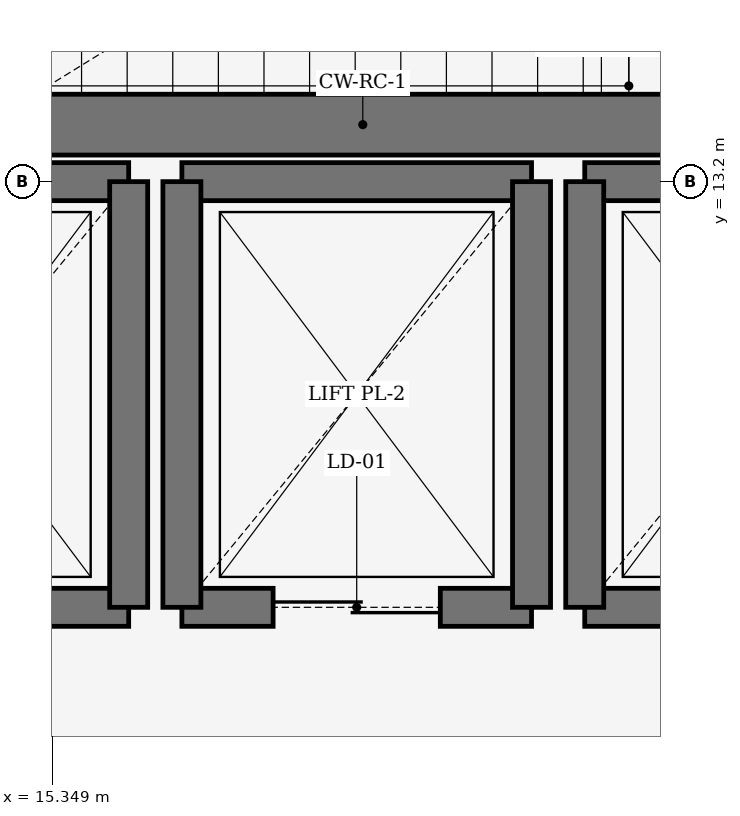
"""IFC4 building model, lengths in metres.
Left out: names, types, materials, properties, quantities, classifications, styles, units other than length and angle.
Written with IfcOpenShell. Run it as: python <this file> out.ifc"""

import sys

from ifc_helpers import new_model, si_unit, direction, frame, frame_2d, origin, place, context, subcontext, project, spatial, rectangle, extrude, element, fill, save


model = new_model("IFC4")
c1 = context("Model", 3, precision=1e-05, world=origin(), true_north=direction((0.0, 1.0)))
c2 = subcontext(c1, "Body", "Model", "MODEL_VIEW")
j1 = project(units=[si_unit("LENGTHUNIT", "METRE"), si_unit("PLANEANGLEUNIT", "RADIAN")], contexts=[c1])
p1 = place(None, origin())
s1 = spatial("IfcSite", under=j1, at=p1, CompositionType="ELEMENT")
p2 = place(p1, origin())
s2 = spatial("IfcBuilding", under=s1, at=p2, CompositionType="ELEMENT")
p3 = place(p2, frame((0.0, 0.0, 9.0)))
s3 = spatial("IfcBuildingStorey", under=s2, at=p3, CompositionType="ELEMENT", Elevation=9.0)
p4 = place(p3, frame((13.4, 13.575, 0.0), z_axis=(0.0, 0.0, 1.0), x_axis=(1.0, 0.0, 0.0)))
e1 = element("IfcWall", 1, at=p4, inside=s3, PredefinedType="SHEAR", context=c2, shape_type="SweptSolid", body=[
    extrude(rectangle(XDim=7.98, YDim=0.4, at=frame_2d((3.99, 0.0))), origin(), (0.0, 0.0, 1.0), 3.96),
])
p5 = place(p3, frame((13.55, 10.4, 0.0), z_axis=(0.0, 0.0, 1.0), x_axis=(1.0, 0.0, 0.0)))
e2 = element("IfcWall", 2, at=p5, inside=s3, PredefinedType="SHEAR", context=c2, shape_type="SweptSolid", body=[
    extrude(rectangle(XDim=2.3, YDim=0.25, at=frame_2d((1.15, 0.0))), origin(), (0.0, 0.0, 1.0), 3.96),
])
p6 = place(p5, frame((0.6, 0.0, 0.0)))
e3 = element("IfcOpeningElement", 3, at=p6, cuts=e2, PredefinedType="OPENING", context=c2, shape_type="SweptSolid", body=[
    extrude(rectangle(XDim=1.1, YDim=2.2, at=frame_2d((0.55, 1.1))), frame((0.0, 0.135, 0.0), z_axis=(0.0, -1.0, 0.0), x_axis=(1.0, 0.0, 0.0)), (0.0, 0.0, 1.0), 0.27),
])
p7 = place(p3, frame((13.55, 13.2, 0.0), z_axis=(0.0, 0.0, 1.0), x_axis=(1.0, 0.0, 0.0)))
e4 = element("IfcWall", 4, at=p7, inside=s3, PredefinedType="SHEAR", context=c2, shape_type="SweptSolid", body=[
    extrude(rectangle(XDim=2.3, YDim=0.25, at=frame_2d((1.15, 0.0))), origin(), (0.0, 0.0, 1.0), 3.96),
])
p8 = place(p3, frame((15.85, 10.4, 0.0), z_axis=(0.0, 0.0, 1.0), x_axis=(0.0, 1.0, 0.0)))
e5 = element("IfcWall", 5, at=p8, inside=s3, PredefinedType="SHEAR", context=c2, shape_type="SweptSolid", body=[
    extrude(rectangle(XDim=2.8, YDim=0.25, at=frame_2d((1.4, 0.0))), origin(), (0.0, 0.0, 1.0), 3.96),
])
p9 = place(p3, frame((16.2, 10.4, 0.0), z_axis=(0.0, 0.0, 1.0), x_axis=(1.0, 0.0, 0.0)))
e6 = element("IfcWall", 6, at=p9, inside=s3, PredefinedType="SHEAR", context=c2, shape_type="SweptSolid", body=[
    extrude(rectangle(XDim=2.3, YDim=0.25, at=frame_2d((1.15, 0.0))), origin(), (0.0, 0.0, 1.0), 3.96),
])
p10 = place(p9, frame((0.6, 0.0, 0.0)))
e7 = element("IfcOpeningElement", 7, at=p10, cuts=e6, PredefinedType="OPENING", context=c2, shape_type="SweptSolid", body=[
    extrude(rectangle(XDim=1.1, YDim=2.2, at=frame_2d((0.55, 1.1))), frame((0.0, 0.135, 0.0), z_axis=(0.0, -1.0, 0.0), x_axis=(1.0, 0.0, 0.0)), (0.0, 0.0, 1.0), 0.27),
])
p11 = place(p3, frame((16.2, 13.2, 0.0), z_axis=(0.0, 0.0, 1.0), x_axis=(1.0, 0.0, 0.0)))
e8 = element("IfcWall", 8, at=p11, inside=s3, PredefinedType="SHEAR", context=c2, shape_type="SweptSolid", body=[
    extrude(rectangle(XDim=2.3, YDim=0.25, at=frame_2d((1.15, 0.0))), origin(), (0.0, 0.0, 1.0), 3.96),
])
for number, where, z_axis, x_axis in (
    (9, (16.2, 10.4, 0.0), (0.0, 0.0, 1.0), (0.0, 1.0, 0.0)),
    (10, (18.5, 10.4, 0.0), (0.0, 0.0, 1.0), (0.0, 1.0, 0.0)),
):
    element("IfcWall", number, at=place(p3, frame(where, z_axis=z_axis, x_axis=x_axis)), inside=s3, PredefinedType="SHEAR", context=c2, shape_type="SweptSolid", body=[
        extrude(rectangle(XDim=2.8, YDim=0.25, at=frame_2d((1.4, 0.0))), origin(), (0.0, 0.0, 1.0), 3.96),
    ])
p12 = place(p3, frame((18.85, 10.4, 0.0), z_axis=(0.0, 0.0, 1.0), x_axis=(1.0, 0.0, 0.0)))
e11 = element("IfcWall", 11, at=p12, inside=s3, PredefinedType="SHEAR", context=c2, shape_type="SweptSolid", body=[
    extrude(rectangle(XDim=2.3, YDim=0.25, at=frame_2d((1.15, 0.0))), origin(), (0.0, 0.0, 1.0), 3.96),
])
p13 = place(p12, frame((0.6, 0.0, 0.0)))
e12 = element("IfcOpeningElement", 12, at=p13, cuts=e11, PredefinedType="OPENING", context=c2, shape_type="SweptSolid", body=[
    extrude(rectangle(XDim=1.1, YDim=2.2, at=frame_2d((0.55, 1.1))), frame((0.0, 0.135, 0.0), z_axis=(0.0, -1.0, 0.0), x_axis=(1.0, 0.0, 0.0)), (0.0, 0.0, 1.0), 0.27),
])
p14 = place(p3, frame((18.85, 13.2, 0.0), z_axis=(0.0, 0.0, 1.0), x_axis=(1.0, 0.0, 0.0)))
e13 = element("IfcWall", 13, at=p14, inside=s3, PredefinedType="SHEAR", context=c2, shape_type="SweptSolid", body=[
    extrude(rectangle(XDim=2.3, YDim=0.25, at=frame_2d((1.15, 0.0))), origin(), (0.0, 0.0, 1.0), 3.96),
])
p15 = place(p3, frame((18.85, 10.4, 0.0), z_axis=(0.0, 0.0, 1.0), x_axis=(0.0, 1.0, 0.0)))
e14 = element("IfcWall", 14, at=p15, inside=s3, PredefinedType="SHEAR", context=c2, shape_type="SweptSolid", body=[
    extrude(rectangle(XDim=2.8, YDim=0.25, at=frame_2d((1.4, 0.0))), origin(), (0.0, 0.0, 1.0), 3.96),
])
p16 = place(p10, origin())
e15 = element("IfcDoor", 15, at=p16, inside=s3, OperationType="DOUBLE_DOOR_SLIDING", PredefinedType="DOOR", context=c2, shape_type="SweptSolid", body=[
    extrude(rectangle(XDim=1.1, YDim=2.2, at=frame_2d((0.55, 1.1))), frame((0.0, 0.025, 0.0), z_axis=(0.0, -1.0, 0.0), x_axis=(1.0, 0.0, 0.0)), (0.0, 0.0, 1.0), 0.05),
])
fill(e7, e15)
save(model, sys.argv[1])
